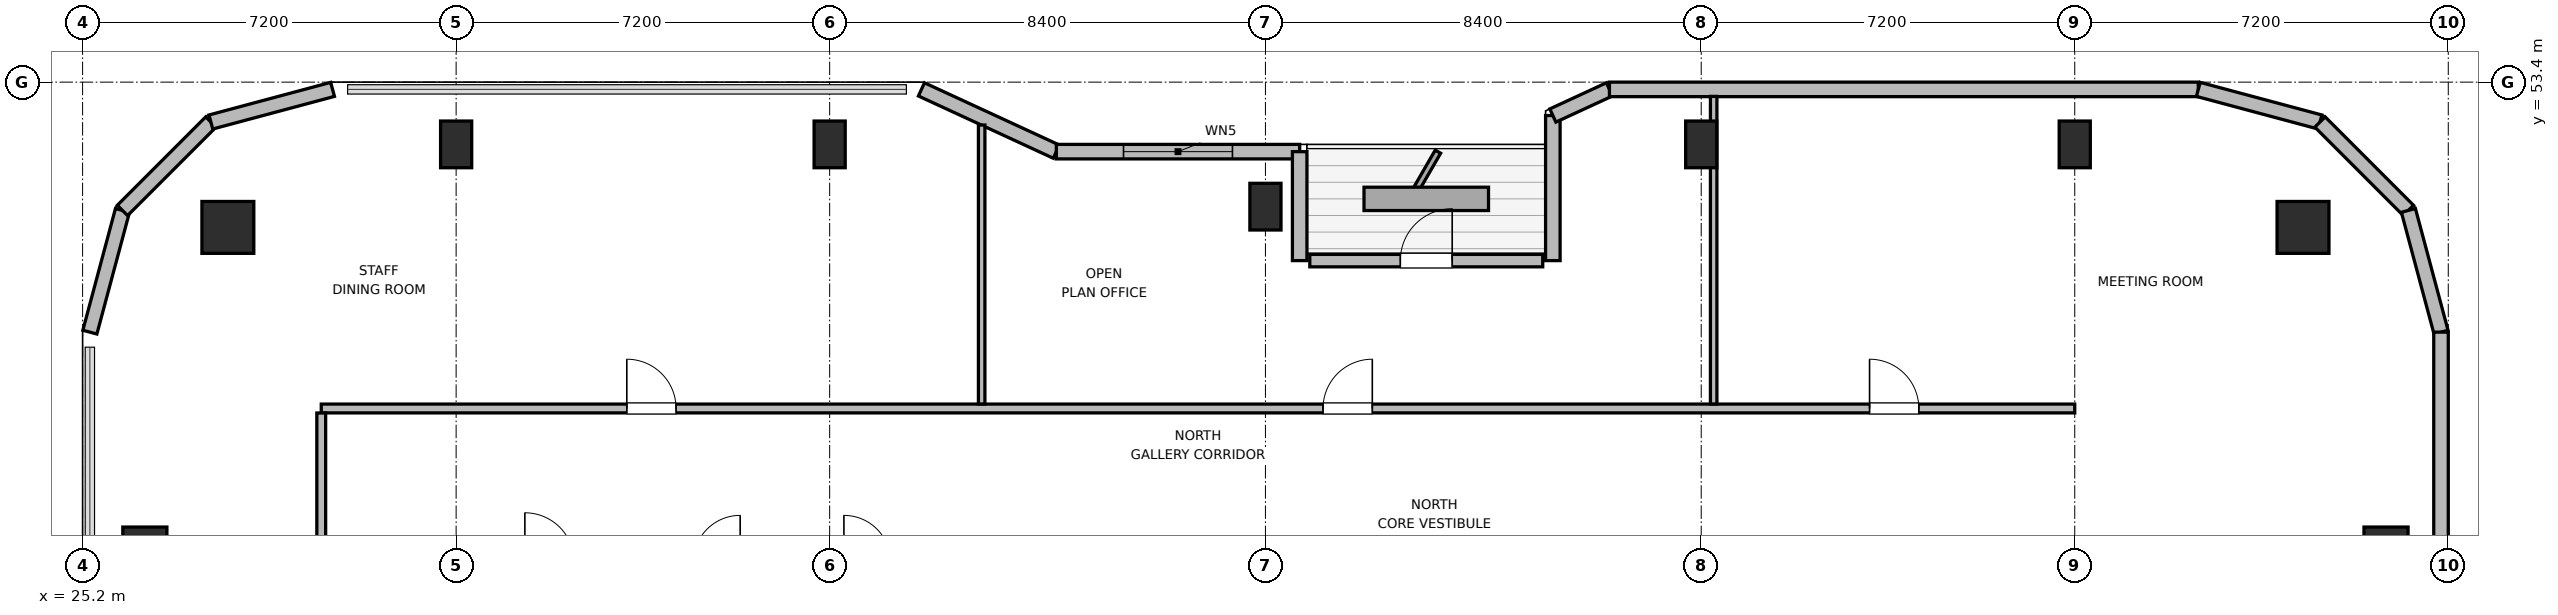
"""IFC4 building model, lengths in metres.
Left out: names, types, materials, properties, quantities, classifications, styles, units other than length and angle.
Written with IfcOpenShell. Run it as: python <this file> out.ifc"""

import sys

from ifc_helpers import new_model, si_unit, direction, frame, frame_2d, origin, origin_2d, place, context, subcontext, project, spatial, rectangle, circle, extrude, element, fill, save


model = new_model("IFC4")
c1 = context("Model", 3, precision=1e-05, world=origin(), true_north=direction((0.0, 1.0)))
c2 = subcontext(c1, "Body", "Model", "MODEL_VIEW")
j1 = project(units=[si_unit("LENGTHUNIT", "METRE"), si_unit("PLANEANGLEUNIT", "RADIAN")], contexts=[c1])
p1 = place(None, origin())
s1 = spatial("IfcSite", under=j1, at=p1, CompositionType="ELEMENT")
p2 = place(p1, origin())
s2 = spatial("IfcBuilding", under=s1, at=p2, CompositionType="ELEMENT")
p3 = place(p2, frame((0.0, 0.0, 342.0)))
s3 = spatial("IfcBuildingStorey", under=s2, at=p3, CompositionType="ELEMENT", Elevation=342.0)
for number, where, z_axis, x_axis in (
    (1, (68.0, 50.6, 0.0), (0.0, 0.0, 1.0), (1.0, 0.0, 0.0)),
    (2, (28.0, 50.6, 0.0), (0.0, 0.0, 1.0), (1.0, 0.0, 0.0)),
):
    element("IfcColumn", number, at=place(p3, frame(where, z_axis=z_axis, x_axis=x_axis)), inside=s3, PredefinedType="COLUMN", context=c2, shape_type="SweptSolid", body=[
        extrude(circle(Radius=0.5, at=origin_2d()), origin(), (0.0, 0.0, 1.0), 4.5),
    ])
for number, where, z_axis, x_axis in (
    (3, (32.4, 52.2, 0.0), (0.0, 0.0, 1.0), (1.0, 0.0, 0.0)),
    (4, (39.6, 52.2, 0.0), (0.0, 0.0, 1.0), (1.0, 0.0, 0.0)),
    (5, (48.0, 51.0, 0.0), (0.0, 0.0, 1.0), (1.0, 0.0, 0.0)),
    (6, (56.4, 52.2, 0.0), (0.0, 0.0, 1.0), (1.0, 0.0, 0.0)),
    (7, (63.6, 52.2, 0.0), (0.0, 0.0, 1.0), (1.0, 0.0, 0.0)),
):
    element("IfcColumn", number, at=place(p3, frame(where, z_axis=z_axis, x_axis=x_axis)), inside=s3, PredefinedType="COLUMN", context=c2, shape_type="SweptSolid", body=[
        extrude(rectangle(XDim=0.6, YDim=0.9, at=origin_2d()), origin(), (0.0, 0.0, 1.0), 4.5),
    ])
for number, where, z_axis, x_axis in (
    (8, (26.4, 44.4, 0.0), (0.0, 0.0, 1.0), (1.0, 0.0, 0.0)),
    (9, (69.6, 44.4, 0.0), (0.0, 0.0, 1.0), (1.0, 0.0, 0.0)),
):
    element("IfcColumn", number, at=place(p3, frame(where, z_axis=z_axis, x_axis=x_axis)), inside=s3, PredefinedType="COLUMN", context=c2, shape_type="SweptSolid", body=[
        extrude(rectangle(XDim=0.85, YDim=0.85, at=origin_2d()), origin(), (0.0, 0.0, 1.0), 4.5),
    ])
p4 = place(p3, frame((25.34, 48.582, 0.0), z_axis=(0.0, 0.0, 1.0), x_axis=(0.258751159445, 0.965944013639, 0.0)))
e10 = element("IfcWall", 10, at=p4, inside=s3, PredefinedType="SOLIDWALL", context=c2, shape_type="SweptSolid", body=[
    extrude(rectangle(XDim=2.429, YDim=0.28, at=frame_2d((1.214, 0.0))), origin(), (0.0, 0.0, 1.0), 4.28),
])
p5 = place(p3, frame((25.969, 50.927, 0.0), z_axis=(0.0, 0.0, 1.0), x_axis=(0.707106781187, 0.707106781187, 0.0)))
e11 = element("IfcWall", 11, at=p5, inside=s3, PredefinedType="SOLIDWALL", context=c2, shape_type="SweptSolid", body=[
    extrude(rectangle(XDim=2.41, YDim=0.28, at=frame_2d((1.205, 0.0))), origin(), (0.0, 0.0, 1.0), 4.28),
])
p6 = place(p3, frame((27.673, 52.632, 0.0), z_axis=(0.0, 0.0, 1.0), x_axis=(0.965937282298, 0.25877628691, 0.0)))
e12 = element("IfcWall", 12, at=p6, inside=s3, PredefinedType="SOLIDWALL", context=c2, shape_type="SweptSolid", body=[
    extrude(rectangle(XDim=2.428, YDim=0.28, at=frame_2d((1.214, 0.0))), origin(), (0.0, 0.0, 1.0), 4.28),
])
p7 = place(p3, frame((41.369, 53.26, 0.0), z_axis=(0.0, 0.0, 1.0), x_axis=(0.907956889006, -0.419063584324, 0.0)))
e13 = element("IfcWall", 13, at=p7, inside=s3, PredefinedType="SOLIDWALL", context=c2, shape_type="SweptSolid", body=[
    extrude(rectangle(XDim=2.864, YDim=0.28, at=frame_2d((1.432, 0.0))), origin(), (0.0, 0.0, 1.0), 2.865),
])
p8 = place(p3, frame((43.969, 52.06, 0.0), z_axis=(0.0, 0.0, 1.0), x_axis=(1.0, 0.0, 0.0)))
e14 = element("IfcWall", 14, at=p8, inside=s3, PredefinedType="SOLIDWALL", context=c2, shape_type="SweptSolid", body=[
    extrude(rectangle(XDim=4.691, YDim=0.28, at=frame_2d((2.345, 0.0))), origin(), (0.0, 0.0, 1.0), 2.865),
])
p9 = place(p8, frame((1.295, 0.0, 0.85)))
e15 = element("IfcOpeningElement", 15, at=p9, cuts=e14, PredefinedType="OPENING", context=c2, shape_type="SweptSolid", body=[
    extrude(rectangle(XDim=2.1, YDim=1.05, at=frame_2d((1.05, 0.525))), frame((0.0, 0.15, 0.0), z_axis=(0.0, -1.0, 0.0), x_axis=(1.0, 0.0, 0.0)), (0.0, 0.0, 1.0), 0.3),
])
p10 = place(p3, frame((48.66, 52.06, 0.0), z_axis=(0.0, 0.0, 1.0), x_axis=(0.0, -1.0, 0.0)))
e16 = element("IfcWall", 16, at=p10, inside=s3, PredefinedType="SOLIDWALL", context=c2, shape_type="SweptSolid", body=[
    extrude(rectangle(XDim=2.1, YDim=0.28, at=frame_2d((1.05, 0.0))), origin(), (0.0, 0.0, 1.0), 2.865),
])
p11 = place(p3, frame((48.855, 49.96, 0.0), z_axis=(0.0, 0.0, 1.0), x_axis=(1.0, 0.0, 0.0)))
e17 = element("IfcWall", 17, at=p11, inside=s3, PredefinedType="SOLIDWALL", context=c2, shape_type="SweptSolid", body=[
    extrude(rectangle(XDim=4.49, YDim=0.24, at=frame_2d((2.245, 0.0))), origin(), (0.0, 0.0, 1.0), 4.28),
])
p12 = place(p11, frame((1.745, 0.0, 0.0)))
e18 = element("IfcOpeningElement", 18, at=p12, cuts=e17, PredefinedType="OPENING", context=c2, shape_type="SweptSolid", body=[
    extrude(rectangle(XDim=1.0, YDim=2.02, at=frame_2d((0.5, 1.01))), frame((0.0, 0.13, 0.0), z_axis=(0.0, -1.0, 0.0), x_axis=(1.0, 0.0, 0.0)), (0.0, 0.0, 1.0), 0.26),
])
p13 = place(p3, frame((53.54, 49.96, 0.0), z_axis=(0.0, 0.0, 1.0), x_axis=(0.0, 1.0, 0.0)))
e19 = element("IfcWall", 19, at=p13, inside=s3, PredefinedType="SOLIDWALL", context=c2, shape_type="SweptSolid", body=[
    extrude(rectangle(XDim=2.796, YDim=0.28, at=frame_2d((1.398, 0.0))), origin(), (0.0, 0.0, 1.0), 2.865),
])
p14 = place(p3, frame((53.54, 52.756, 0.0), z_axis=(0.0, 0.0, 1.0), x_axis=(0.907893953211, 0.419199916176, 0.0)))
e20 = element("IfcWall", 20, at=p14, inside=s3, PredefinedType="SOLIDWALL", context=c2, shape_type="SweptSolid", body=[
    extrude(rectangle(XDim=1.201, YDim=0.28, at=frame_2d((0.601, 0.0))), origin(), (0.0, 0.0, 1.0), 4.28),
])
p15 = place(p3, frame((54.631, 53.26, 0.0), z_axis=(0.0, 0.0, 1.0), x_axis=(1.0, 0.0, 0.0)))
e21 = element("IfcWall", 21, at=p15, inside=s3, PredefinedType="SOLIDWALL", context=c2, shape_type="SweptSolid", body=[
    extrude(rectangle(XDim=11.351, YDim=0.28, at=frame_2d((5.675, 0.0))), origin(), (0.0, 0.0, 1.0), 4.28),
])
p16 = place(p3, frame((65.982, 53.26, 0.0), z_axis=(0.0, 0.0, 1.0), x_axis=(0.965937282298, -0.25877628691, 0.0)))
e22 = element("IfcWall", 22, at=p16, inside=s3, PredefinedType="SOLIDWALL", context=c2, shape_type="SweptSolid", body=[
    extrude(rectangle(XDim=2.428, YDim=0.28, at=frame_2d((1.214, 0.0))), origin(), (0.0, 0.0, 1.0), 4.28),
])
p17 = place(p3, frame((68.327, 52.632, 0.0), z_axis=(0.0, 0.0, 1.0), x_axis=(0.707106781187, -0.707106781187, 0.0)))
e23 = element("IfcWall", 23, at=p17, inside=s3, PredefinedType="SOLIDWALL", context=c2, shape_type="SweptSolid", body=[
    extrude(rectangle(XDim=2.41, YDim=0.28, at=frame_2d((1.205, 0.0))), origin(), (0.0, 0.0, 1.0), 4.28),
])
p18 = place(p3, frame((70.031, 50.927, 0.0), z_axis=(0.0, 0.0, 1.0), x_axis=(0.258751159445, -0.965944013639, 0.0)))
e24 = element("IfcWall", 24, at=p18, inside=s3, PredefinedType="SOLIDWALL", context=c2, shape_type="SweptSolid", body=[
    extrude(rectangle(XDim=2.429, YDim=0.28, at=frame_2d((1.214, 0.0))), origin(), (0.0, 0.0, 1.0), 4.28),
])
p19 = place(p3, frame((70.66, 48.582, 0.0), z_axis=(0.0, 0.0, 1.0), x_axis=(0.0, -1.0, 0.0)))
e25 = element("IfcWall", 25, at=p19, inside=s3, PredefinedType="SOLIDWALL", context=c2, shape_type="SweptSolid", body=[
    extrude(rectangle(XDim=5.842, YDim=0.28, at=frame_2d((2.921, 0.0))), origin(), (0.0, 0.0, 1.0), 4.28),
])
p20 = place(p3, frame((29.8, 47.11, 0.0), z_axis=(0.0, 0.0, 1.0), x_axis=(1.0, 0.0, 0.0)))
e26 = element("IfcWall", 26, at=p20, inside=s3, PredefinedType="PARTITIONING", context=c2, shape_type="SweptSolid", body=[
    extrude(rectangle(XDim=33.8, YDim=0.17, at=frame_2d((16.9, 0.0))), origin(), (0.0, 0.0, 1.0), 4.28),
])
p21 = place(p20, frame((5.89, 0.0, 0.0)))
e27 = element("IfcOpeningElement", 27, at=p21, cuts=e26, PredefinedType="OPENING", context=c2, shape_type="SweptSolid", body=[
    extrude(rectangle(XDim=0.95, YDim=2.04, at=frame_2d((0.475, 1.02))), frame((0.0, 0.095, 0.0), z_axis=(0.0, -1.0, 0.0), x_axis=(1.0, 0.0, 0.0)), (0.0, 0.0, 1.0), 0.19),
])
p22 = place(p20, frame((19.31, 0.0, 0.0)))
e28 = element("IfcOpeningElement", 28, at=p22, cuts=e26, PredefinedType="OPENING", context=c2, shape_type="SweptSolid", body=[
    extrude(rectangle(XDim=0.95, YDim=2.04, at=frame_2d((0.475, 1.02))), frame((0.0, 0.095, 0.0), z_axis=(0.0, -1.0, 0.0), x_axis=(1.0, 0.0, 0.0)), (0.0, 0.0, 1.0), 0.19),
])
p23 = place(p20, frame((29.845, 0.0, 0.0)))
e29 = element("IfcOpeningElement", 29, at=p23, cuts=e26, PredefinedType="OPENING", context=c2, shape_type="SweptSolid", body=[
    extrude(rectangle(XDim=0.95, YDim=2.04, at=frame_2d((0.475, 1.02))), frame((0.0, 0.095, 0.0), z_axis=(0.0, -1.0, 0.0), x_axis=(1.0, 0.0, 0.0)), (0.0, 0.0, 1.0), 0.19),
])
p24 = place(p3, frame((29.8, 24.977, 0.0), z_axis=(0.0, 0.0, 1.0), x_axis=(0.0, 1.0, 0.0)))
e30 = element("IfcWall", 30, at=p24, inside=s3, PredefinedType="PARTITIONING", context=c2, shape_type="SweptSolid", body=[
    extrude(rectangle(XDim=22.046, YDim=0.17, at=frame_2d((11.023, 0.0))), origin(), (0.0, 0.0, 1.0), 4.28),
])
p25 = place(p24, frame((3.693, 0.0, 0.0)))
e31 = element("IfcOpeningElement", 31, at=p25, cuts=e30, PredefinedType="OPENING", context=c2, shape_type="SweptSolid", body=[
    extrude(rectangle(XDim=0.95, YDim=2.04, at=frame_2d((0.475, 1.02))), frame((0.0, 0.095, 0.0), z_axis=(0.0, -1.0, 0.0), x_axis=(1.0, 0.0, 0.0)), (0.0, 0.0, 1.0), 0.19),
])
p26 = place(p24, frame((11.148, 0.0, 0.0)))
e32 = element("IfcOpeningElement", 32, at=p26, cuts=e30, PredefinedType="OPENING", context=c2, shape_type="SweptSolid", body=[
    extrude(rectangle(XDim=0.95, YDim=2.04, at=frame_2d((0.475, 1.02))), frame((0.0, 0.095, 0.0), z_axis=(0.0, -1.0, 0.0), x_axis=(1.0, 0.0, 0.0)), (0.0, 0.0, 1.0), 0.19),
])
p27 = place(p24, frame((18.003, 0.0, 0.0)))
e33 = element("IfcOpeningElement", 33, at=p27, cuts=e30, PredefinedType="OPENING", context=c2, shape_type="SweptSolid", body=[
    extrude(rectangle(XDim=0.95, YDim=2.04, at=frame_2d((0.475, 1.02))), frame((0.0, 0.095, 0.0), z_axis=(0.0, -1.0, 0.0), x_axis=(1.0, 0.0, 0.0)), (0.0, 0.0, 1.0), 0.19),
])
p28 = place(p3, frame((42.53, 47.197, 0.0), z_axis=(0.0, 0.0, 1.0), x_axis=(0.0, 1.0, 0.0)))
e34 = element("IfcWall", 34, at=p28, inside=s3, PredefinedType="PARTITIONING", context=c2, shape_type="SweptSolid", body=[
    extrude(rectangle(XDim=5.376, YDim=0.125, at=frame_2d((2.688, 0.0))), origin(), (0.0, 0.0, 1.0), 3.643),
])
p29 = place(p3, frame((56.64, 47.197, 0.0), z_axis=(0.0, 0.0, 1.0), x_axis=(0.0, 1.0, 0.0)))
e35 = element("IfcWall", 35, at=p29, inside=s3, PredefinedType="PARTITIONING", context=c2, shape_type="SweptSolid", body=[
    extrude(rectangle(XDim=5.928, YDim=0.125, at=frame_2d((2.964, 0.0))), origin(), (0.0, 0.0, 1.0), 3.654),
])
p30 = place(p9, origin())
e36 = element("IfcWindow", 36, at=p30, inside=s3, PartitioningType="SINGLE_PANEL", PredefinedType="WINDOW", context=c2, shape_type="SweptSolid", body=[
    extrude(rectangle(XDim=2.1, YDim=1.05, at=frame_2d((1.05, 0.525))), frame((0.0, 0.03, 0.0), z_axis=(0.0, -1.0, 0.0), x_axis=(1.0, 0.0, 0.0)), (0.0, 0.0, 1.0), 0.06),
])
fill(e15, e36)
p31 = place(p12, origin())
e37 = element("IfcDoor", 37, at=p31, inside=s3, OperationType="SINGLE_SWING_RIGHT", PredefinedType="DOOR", context=c2, shape_type="SweptSolid", body=[
    extrude(rectangle(XDim=1.0, YDim=2.02, at=frame_2d((0.5, 1.01))), frame((0.0, 0.025, 0.0), z_axis=(0.0, -1.0, 0.0), x_axis=(1.0, 0.0, 0.0)), (0.0, 0.0, 1.0), 0.05),
])
fill(e18, e37)
p32 = place(p21, origin())
e38 = element("IfcDoor", 38, at=p32, inside=s3, OperationType="SINGLE_SWING_LEFT", PredefinedType="DOOR", context=c2, shape_type="SweptSolid", body=[
    extrude(rectangle(XDim=0.95, YDim=2.04, at=frame_2d((0.475, 1.02))), frame((0.0, 0.025, 0.0), z_axis=(0.0, -1.0, 0.0), x_axis=(1.0, 0.0, 0.0)), (0.0, 0.0, 1.0), 0.05),
])
fill(e27, e38)
p33 = place(p22, origin())
e39 = element("IfcDoor", 39, at=p33, inside=s3, OperationType="SINGLE_SWING_RIGHT", PredefinedType="DOOR", context=c2, shape_type="SweptSolid", body=[
    extrude(rectangle(XDim=0.95, YDim=2.04, at=frame_2d((0.475, 1.02))), frame((0.0, 0.025, 0.0), z_axis=(0.0, -1.0, 0.0), x_axis=(1.0, 0.0, 0.0)), (0.0, 0.0, 1.0), 0.05),
])
fill(e28, e39)
p34 = place(p23, origin())
e40 = element("IfcDoor", 40, at=p34, inside=s3, OperationType="SINGLE_SWING_LEFT", PredefinedType="DOOR", context=c2, shape_type="SweptSolid", body=[
    extrude(rectangle(XDim=0.95, YDim=2.04, at=frame_2d((0.475, 1.02))), frame((0.0, 0.025, 0.0), z_axis=(0.0, -1.0, 0.0), x_axis=(1.0, 0.0, 0.0)), (0.0, 0.0, 1.0), 0.05),
])
fill(e29, e40)
save(model, sys.argv[1])
